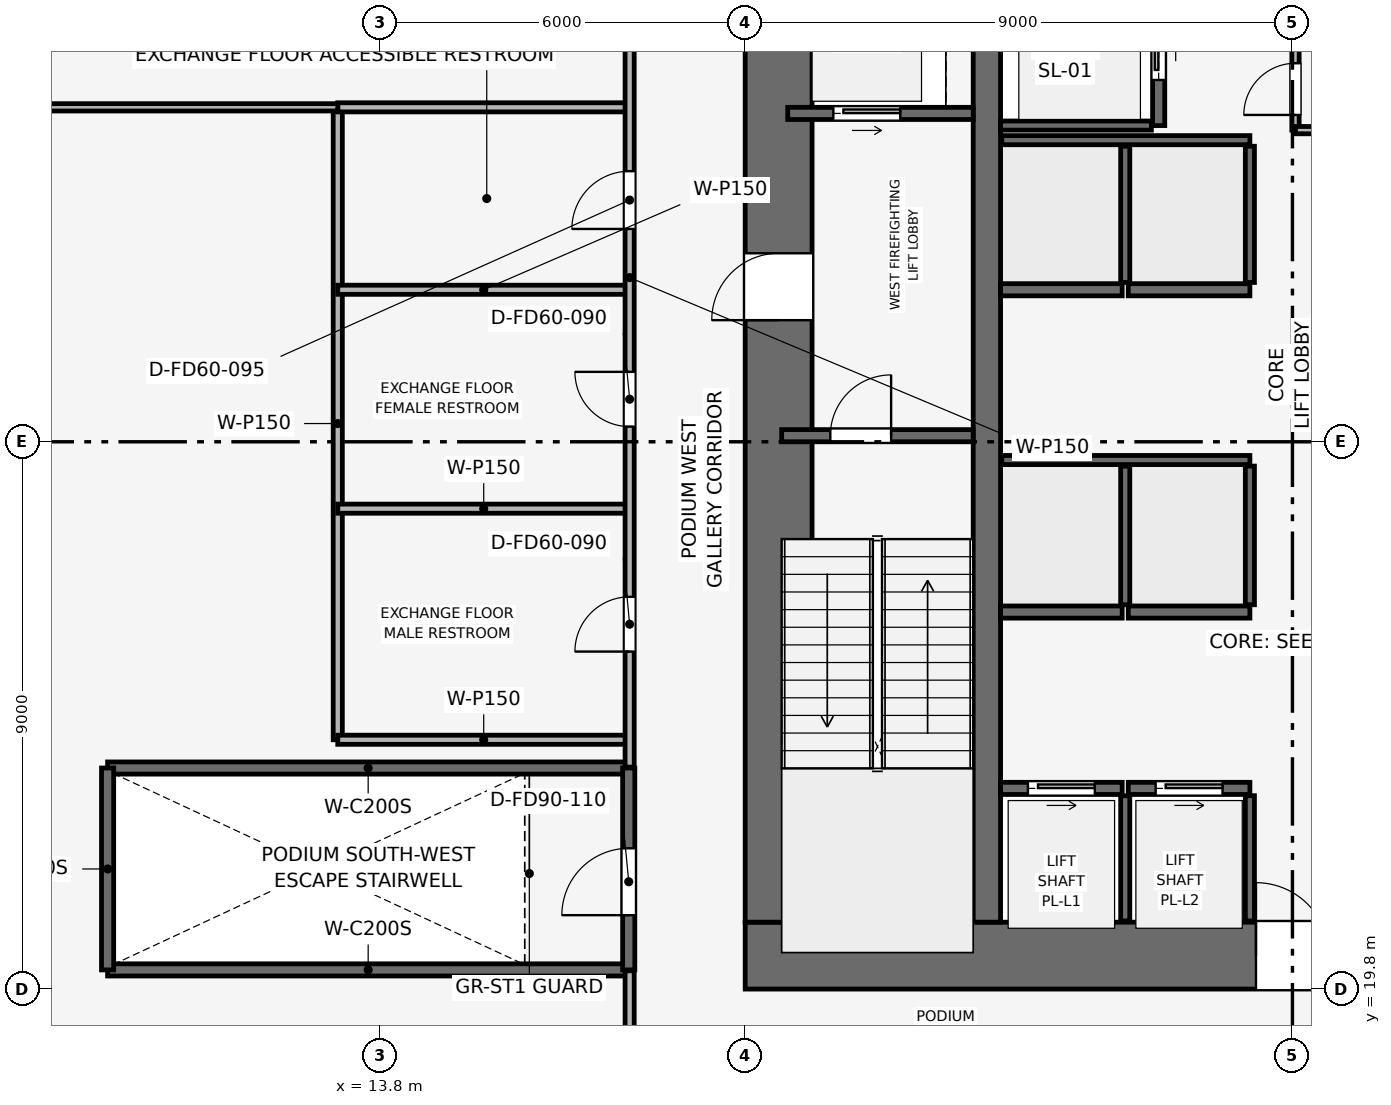
"""IFC4 building model, lengths in metres.
Left out: names, types, materials, properties, quantities, classifications, styles, units other than length and angle.
Written with IfcOpenShell. Run it as: python <this file> out.ifc"""

import sys

from ifc_helpers import new_model, si_unit, direction, frame, frame_2d, origin, place, context, subcontext, project, spatial, rectangle, extrude, element, fill, save


model = new_model("IFC4")
c1 = context("Model", 3, precision=1e-05, world=origin(), true_north=direction((0.0, 1.0)))
c2 = subcontext(c1, "Body", "Model", "MODEL_VIEW")
j1 = project(units=[si_unit("LENGTHUNIT", "METRE"), si_unit("PLANEANGLEUNIT", "RADIAN")], contexts=[c1])
p1 = place(None, origin())
s1 = spatial("IfcSite", under=j1, at=p1, CompositionType="ELEMENT")
p2 = place(p1, origin())
s2 = spatial("IfcBuilding", under=s1, at=p2, CompositionType="ELEMENT")
p3 = place(p2, frame((0.0, 0.0, 19.2)))
s3 = spatial("IfcBuildingStorey", under=s2, at=p3, CompositionType="ELEMENT", Elevation=19.2)
p4 = place(p3, frame((19.8, 20.35, 0.0), z_axis=(0.0, 0.0, 1.0), x_axis=(1.0, 0.0, 0.0)))
e1 = element("IfcWall", 1, at=p4, inside=s3, PredefinedType="SHEAR", context=c2, shape_type="SweptSolid", body=[
    extrude(rectangle(XDim=18.0, YDim=1.1, at=frame_2d((9.0, 0.0))), origin(), (0.0, 0.0, 1.0), 4.8),
])
p5 = place(p4, frame((8.4, 0.0, 0.0)))
e2 = element("IfcOpeningElement", 2, at=p5, cuts=e1, PredefinedType="OPENING", context=c2, shape_type="SweptSolid", body=[
    extrude(rectangle(XDim=1.2, YDim=2.2, at=frame_2d((0.6, 1.1))), frame((0.0, 0.56, 0.0), z_axis=(0.0, -1.0, 0.0), x_axis=(1.0, 0.0, 0.0)), (0.0, 0.0, 1.0), 1.12),
])
p6 = place(p3, frame((20.35, 20.9, 0.0), z_axis=(0.0, 0.0, 1.0), x_axis=(0.0, 1.0, 0.0)))
e3 = element("IfcWall", 3, at=p6, inside=s3, PredefinedType="SHEAR", context=c2, shape_type="SweptSolid", body=[
    extrude(rectangle(XDim=15.8, YDim=1.1, at=frame_2d((7.9, 0.0))), origin(), (0.0, 0.0, 1.0), 4.8),
])
p7 = place(p6, frame((9.9, 0.0, 0.0)))
e4 = element("IfcOpeningElement", 4, at=p7, cuts=e3, PredefinedType="OPENING", context=c2, shape_type="SweptSolid", body=[
    extrude(rectangle(XDim=1.1, YDim=2.15, at=frame_2d((0.55, 1.075))), frame((0.0, 0.56, 0.0), z_axis=(0.0, -1.0, 0.0), x_axis=(1.0, 0.0, 0.0)), (0.0, 0.0, 1.0), 1.12),
])
p8 = place(p3, frame((23.775, 20.9, 0.0), z_axis=(0.0, 0.0, 1.0), x_axis=(0.0, 1.0, 0.0)))
e5 = element("IfcWall", 5, at=p8, inside=s3, PredefinedType="SHEAR", context=c2, shape_type="SweptSolid", body=[
    extrude(rectangle(XDim=15.8, YDim=0.45, at=frame_2d((7.9, 0.0))), origin(), (0.0, 0.0, 1.0), 4.8),
])
p9 = place(p3, frame((20.4, 28.9, 0.0), z_axis=(0.0, 0.0, 1.0), x_axis=(1.0, 0.0, 0.0)))
e6 = element("IfcWall", 6, at=p9, inside=s3, PredefinedType="SHEAR", context=c2, shape_type="SweptSolid", body=[
    extrude(rectangle(XDim=3.15, YDim=0.2, at=frame_2d((1.575, 0.0))), origin(), (0.0, 0.0, 1.0), 4.35),
])
p10 = place(p9, frame((0.8, 0.0, 0.0)))
e7 = element("IfcOpeningElement", 7, at=p10, cuts=e6, PredefinedType="OPENING", context=c2, shape_type="SweptSolid", body=[
    extrude(rectangle(XDim=1.0, YDim=2.1, at=frame_2d((0.5, 1.05))), frame((0.0, 0.11, 0.0), z_axis=(0.0, -1.0, 0.0), x_axis=(1.0, 0.0, 0.0)), (0.0, 0.0, 1.0), 0.22),
])
p11 = place(p3, frame((20.5, 34.2, 0.0), z_axis=(0.0, 0.0, 1.0), x_axis=(1.0, 0.0, 0.0)))
e8 = element("IfcWall", 8, at=p11, inside=s3, PredefinedType="SHEAR", context=c2, shape_type="SweptSolid", body=[
    extrude(rectangle(XDim=3.05, YDim=0.2, at=frame_2d((1.525, 0.0))), origin(), (0.0, 0.0, 1.0), 4.35),
])
p12 = place(p11, frame((0.75, 0.0, 0.0)))
e9 = element("IfcOpeningElement", 9, at=p12, cuts=e8, PredefinedType="OPENING", context=c2, shape_type="SweptSolid", body=[
    extrude(rectangle(XDim=1.1, YDim=2.15, at=frame_2d((0.55, 1.075))), frame((0.0, 0.11, 0.0), z_axis=(0.0, -1.0, 0.0), x_axis=(1.0, 0.0, 0.0)), (0.0, 0.0, 1.0), 0.22),
])
p13 = place(p3, frame((26.6, 34.0, 0.0), z_axis=(0.0, 0.0, 1.0), x_axis=(0.0, 1.0, 0.0)))
e10 = element("IfcWall", 10, at=p13, inside=s3, PredefinedType="SHEAR", context=c2, shape_type="SweptSolid", body=[
    extrude(rectangle(XDim=2.7, YDim=0.2, at=frame_2d((1.35, 0.0))), origin(), (0.0, 0.0, 1.0), 4.35),
])
p14 = place(p13, frame((0.75, 0.0, 0.0)))
e11 = element("IfcOpeningElement", 11, at=p14, cuts=e10, PredefinedType="OPENING", context=c2, shape_type="SweptSolid", body=[
    extrude(rectangle(XDim=1.1, YDim=2.15, at=frame_2d((0.55, 1.075))), frame((0.0, 0.11, 0.0), z_axis=(0.0, -1.0, 0.0), x_axis=(1.0, 0.0, 0.0)), (0.0, 0.0, 1.0), 0.22),
])
p15 = place(p3, frame((24.0, 34.0, 0.0), z_axis=(0.0, 0.0, 1.0), x_axis=(1.0, 0.0, 0.0)))
e12 = element("IfcWall", 12, at=p15, inside=s3, PredefinedType="SHEAR", context=c2, shape_type="SweptSolid", body=[
    extrude(rectangle(XDim=2.48, YDim=0.15, at=frame_2d((1.24, 0.0))), origin(), (0.0, 0.0, 1.0), 4.35),
])
p16 = place(p3, frame((24.0, 23.1, 0.0), z_axis=(0.0, 0.0, 1.0), x_axis=(1.0, 0.0, 0.0)))
e13 = element("IfcWall", 13, at=p16, inside=s3, PredefinedType="SHEAR", context=c2, shape_type="SweptSolid", body=[
    extrude(rectangle(XDim=2.0, YDim=0.2, at=frame_2d((1.0, 0.0))), origin(), (0.0, 0.0, 1.0), 4.35),
])
p17 = place(p16, frame((0.45, 0.0, 0.0)))
e14 = element("IfcOpeningElement", 14, at=p17, cuts=e13, PredefinedType="OPENING", context=c2, shape_type="SweptSolid", body=[
    extrude(rectangle(XDim=1.1, YDim=2.15, at=frame_2d((0.55, 1.075))), frame((0.0, 0.11, 0.0), z_axis=(0.0, -1.0, 0.0), x_axis=(1.0, 0.0, 0.0)), (0.0, 0.0, 1.0), 0.22),
])
p18 = place(p3, frame((26.1, 23.1, 0.0), z_axis=(0.0, 0.0, 1.0), x_axis=(1.0, 0.0, 0.0)))
e15 = element("IfcWall", 15, at=p18, inside=s3, PredefinedType="SHEAR", context=c2, shape_type="SweptSolid", body=[
    extrude(rectangle(XDim=2.0, YDim=0.2, at=frame_2d((1.0, 0.0))), origin(), (0.0, 0.0, 1.0), 4.35),
])
p19 = place(p18, frame((0.45, 0.0, 0.0)))
e16 = element("IfcOpeningElement", 16, at=p19, cuts=e15, PredefinedType="OPENING", context=c2, shape_type="SweptSolid", body=[
    extrude(rectangle(XDim=1.1, YDim=2.15, at=frame_2d((0.55, 1.075))), frame((0.0, 0.11, 0.0), z_axis=(0.0, -1.0, 0.0), x_axis=(1.0, 0.0, 0.0)), (0.0, 0.0, 1.0), 0.22),
])
for number, where, z_axis, x_axis in (
    (17, (24.0, 26.0, 0.0), (0.0, 0.0, 1.0), (1.0, 0.0, 0.0)),
    (18, (26.1, 26.0, 0.0), (0.0, 0.0, 1.0), (1.0, 0.0, 0.0)),
    (19, (24.0, 31.3, 0.0), (0.0, 0.0, 1.0), (1.0, 0.0, 0.0)),
    (20, (26.1, 31.3, 0.0), (0.0, 0.0, 1.0), (1.0, 0.0, 0.0)),
):
    element("IfcWall", number, at=place(p3, frame(where, z_axis=z_axis, x_axis=x_axis)), inside=s3, PredefinedType="SHEAR", context=c2, shape_type="SweptSolid", body=[
        extrude(rectangle(XDim=2.0, YDim=0.2, at=frame_2d((1.0, 0.0))), origin(), (0.0, 0.0, 1.0), 4.35),
    ])
for number, where, z_axis, x_axis in (
    (21, (26.05, 20.92, 0.0), (0.0, 0.0, 1.0), (0.0, 1.0, 0.0)),
    (22, (28.1, 20.92, 0.0), (0.0, 0.0, 1.0), (0.0, 1.0, 0.0)),
):
    element("IfcWall", number, at=place(p3, frame(where, z_axis=z_axis, x_axis=x_axis)), inside=s3, PredefinedType="SHEAR", context=c2, shape_type="SweptSolid", body=[
        extrude(rectangle(XDim=2.06, YDim=0.15, at=frame_2d((1.03, 0.0))), origin(), (0.0, 0.0, 1.0), 4.35),
    ])
p20 = place(p3, frame((24.02, 28.5, 0.0), z_axis=(0.0, 0.0, 1.0), x_axis=(1.0, 0.0, 0.0)))
e23 = element("IfcWall", 23, at=p20, inside=s3, PredefinedType="SHEAR", context=c2, shape_type="SweptSolid", body=[
    extrude(rectangle(XDim=4.08, YDim=0.15, at=frame_2d((2.04, 0.0))), origin(), (0.0, 0.0, 1.0), 4.35),
])
for number, where, z_axis, x_axis in (
    (24, (26.05, 26.12, 0.0), (0.0, 0.0, 1.0), (0.0, 1.0, 0.0)),
    (25, (28.1, 26.12, 0.0), (0.0, 0.0, 1.0), (0.0, 1.0, 0.0)),
):
    element("IfcWall", number, at=place(p3, frame(where, z_axis=z_axis, x_axis=x_axis)), inside=s3, PredefinedType="SHEAR", context=c2, shape_type="SweptSolid", body=[
        extrude(rectangle(XDim=2.28, YDim=0.15, at=frame_2d((1.14, 0.0))), origin(), (0.0, 0.0, 1.0), 4.35),
    ])
p21 = place(p3, frame((24.02, 33.76, 0.0), z_axis=(0.0, 0.0, 1.0), x_axis=(1.0, 0.0, 0.0)))
e26 = element("IfcWall", 26, at=p21, inside=s3, PredefinedType="SHEAR", context=c2, shape_type="SweptSolid", body=[
    extrude(rectangle(XDim=4.08, YDim=0.15, at=frame_2d((2.04, 0.0))), origin(), (0.0, 0.0, 1.0), 4.35),
])
for number, where, z_axis, x_axis in (
    (27, (26.05, 31.42, 0.0), (0.0, 0.0, 1.0), (0.0, 1.0, 0.0)),
    (28, (28.1, 31.42, 0.0), (0.0, 0.0, 1.0), (0.0, 1.0, 0.0)),
):
    element("IfcWall", number, at=place(p3, frame(where, z_axis=z_axis, x_axis=x_axis)), inside=s3, PredefinedType="SHEAR", context=c2, shape_type="SweptSolid", body=[
        extrude(rectangle(XDim=2.24, YDim=0.15, at=frame_2d((1.12, 0.0))), origin(), (0.0, 0.0, 1.0), 4.35),
    ])
for number, where, z_axis, x_axis in (
    (29, (9.315, 20.115, 0.0), (0.0, 0.0, 1.0), (1.0, 0.0, 0.0)),
    (30, (9.315, 23.435, 0.0), (0.0, 0.0, 1.0), (1.0, 0.0, 0.0)),
):
    element("IfcWall", number, at=place(p3, frame(where, z_axis=z_axis, x_axis=x_axis)), inside=s3, PredefinedType="SHEAR", context=c2, shape_type="SweptSolid", body=[
        extrude(rectangle(XDim=8.57, YDim=0.2, at=frame_2d((4.285, 0.0))), origin(), (0.0, 0.0, 1.0), 4.35),
    ])
p22 = place(p3, frame((9.315, 20.115, 0.0), z_axis=(0.0, 0.0, 1.0), x_axis=(0.0, 1.0, 0.0)))
e31 = element("IfcWall", 31, at=p22, inside=s3, PredefinedType="SHEAR", context=c2, shape_type="SweptSolid", body=[
    extrude(rectangle(XDim=3.32, YDim=0.2, at=frame_2d((1.66, 0.0))), origin(), (0.0, 0.0, 1.0), 4.35),
])
p23 = place(p3, frame((17.885, 20.115, 0.0), z_axis=(0.0, 0.0, 1.0), x_axis=(0.0, 1.0, 0.0)))
e32 = element("IfcWall", 32, at=p23, inside=s3, PredefinedType="SHEAR", context=c2, shape_type="SweptSolid", body=[
    extrude(rectangle(XDim=3.32, YDim=0.2, at=frame_2d((1.66, 0.0))), origin(), (0.0, 0.0, 1.0), 4.35),
])
p24 = place(p23, frame((0.9, 0.0, 0.0)))
e33 = element("IfcOpeningElement", 33, at=p24, cuts=e32, PredefinedType="OPENING", context=c2, shape_type="SweptSolid", body=[
    extrude(rectangle(XDim=1.1, YDim=2.15, at=frame_2d((0.55, 1.075))), frame((0.0, 0.11, 0.0), z_axis=(0.0, -1.0, 0.0), x_axis=(1.0, 0.0, 0.0)), (0.0, 0.0, 1.0), 0.22),
])
p25 = place(p3, frame((28.85, 33.925, 0.0), z_axis=(0.0, 0.0, 1.0), x_axis=(0.0, 1.0, 0.0)))
e34 = element("IfcWall", 34, at=p25, inside=s3, PredefinedType="PARTITIONING", context=c2, shape_type="SweptSolid", body=[
    extrude(rectangle(XDim=2.775, YDim=0.12, at=frame_2d((1.387, 0.0))), origin(), (0.0, 0.0, 1.0), 4.35),
])
p26 = place(p25, frame((0.25, 0.0, 0.0)))
e35 = element("IfcOpeningElement", 35, at=p26, cuts=e34, PredefinedType="OPENING", context=c2, shape_type="SweptSolid", body=[
    extrude(rectangle(XDim=0.85, YDim=2.1, at=frame_2d((0.425, 1.05))), frame((0.0, 0.07, 0.0), z_axis=(0.0, -1.0, 0.0), x_axis=(1.0, 0.0, 0.0)), (0.0, 0.0, 1.0), 0.14),
])
p27 = place(p25, frame((1.545, 0.0, 0.0)))
e36 = element("IfcOpeningElement", 36, at=p27, cuts=e34, PredefinedType="OPENING", context=c2, shape_type="SweptSolid", body=[
    extrude(rectangle(XDim=0.85, YDim=2.1, at=frame_2d((0.425, 1.05))), frame((0.0, 0.07, 0.0), z_axis=(0.0, -1.0, 0.0), x_axis=(1.0, 0.0, 0.0)), (0.0, 0.0, 1.0), 0.14),
])
p28 = place(p3, frame((28.85, 33.925, 0.0), z_axis=(0.0, 0.0, 1.0), x_axis=(1.0, 0.0, 0.0)))
e37 = element("IfcWall", 37, at=p28, inside=s3, PredefinedType="PARTITIONING", context=c2, shape_type="SweptSolid", body=[
    extrude(rectangle(XDim=3.3, YDim=0.12, at=frame_2d((1.65, 0.0))), origin(), (0.0, 0.0, 1.0), 4.35),
])
p29 = place(p3, frame((13.1, 23.9, 0.0), z_axis=(0.0, 0.0, 1.0), x_axis=(0.0, 1.0, 0.0)))
e38 = element("IfcWall", 38, at=p29, inside=s3, PredefinedType="PARTITIONING", context=c2, shape_type="SweptSolid", body=[
    extrude(rectangle(XDim=10.4, YDim=0.15, at=frame_2d((5.2, 0.0))), origin(), (0.0, 0.0, 1.0), 3.435),
])
for number, where, z_axis, x_axis in (
    (39, (13.1, 23.9, 0.0), (0.0, 0.0, 1.0), (1.0, 0.0, 0.0)),
    (40, (13.1, 34.3, 0.0), (0.0, 0.0, 1.0), (1.0, 0.0, 0.0)),
    (41, (13.1, 27.7, 0.0), (0.0, 0.0, 1.0), (1.0, 0.0, 0.0)),
    (42, (13.1, 31.3, 0.0), (0.0, 0.0, 1.0), (1.0, 0.0, 0.0)),
):
    element("IfcWall", number, at=place(p3, frame(where, z_axis=z_axis, x_axis=x_axis)), inside=s3, PredefinedType="PARTITIONING", context=c2, shape_type="SweptSolid", body=[
        extrude(rectangle(XDim=4.8, YDim=0.15, at=frame_2d((2.4, 0.0))), origin(), (0.0, 0.0, 1.0), 4.35),
    ])
p30 = place(p3, frame((0.85, 34.3, 0.0), z_axis=(0.0, 0.0, 1.0), x_axis=(1.0, 0.0, 0.0)))
e43 = element("IfcWall", 43, at=p30, inside=s3, PredefinedType="PARTITIONING", context=c2, shape_type="SweptSolid", body=[
    extrude(rectangle(XDim=12.25, YDim=0.12, at=frame_2d((6.125, 0.0))), origin(), (0.0, 0.0, 1.0), 3.335),
])
p31 = place(p3, frame((17.9, 17.9, 0.0), z_axis=(0.0, 0.0, 1.0), x_axis=(0.0, 1.0, 0.0)))
e44 = element("IfcWall", 44, at=p31, inside=s3, PredefinedType="PARTITIONING", context=c2, shape_type="SweptSolid", body=[
    extrude(rectangle(XDim=2.2, YDim=0.15, at=frame_2d((1.1, 0.0))), origin(), (0.0, 0.0, 1.0), 4.35),
])
p32 = place(p3, frame((17.9, 23.45, 0.0), z_axis=(0.0, 0.0, 1.0), x_axis=(0.0, 1.0, 0.0)))
e45 = element("IfcWall", 45, at=p32, inside=s3, PredefinedType="PARTITIONING", context=c2, shape_type="SweptSolid", body=[
    extrude(rectangle(XDim=16.25, YDim=0.15, at=frame_2d((8.125, 0.0))), origin(), (0.0, 0.0, 1.0), 3.435),
])
p33 = place(p32, frame((1.9, 0.0, 0.0)))
e46 = element("IfcOpeningElement", 46, at=p33, cuts=e45, PredefinedType="OPENING", context=c2, shape_type="SweptSolid", body=[
    extrude(rectangle(XDim=0.9, YDim=2.1, at=frame_2d((0.45, 1.05))), frame((0.0, 0.085, 0.0), z_axis=(0.0, -1.0, 0.0), x_axis=(1.0, 0.0, 0.0)), (0.0, 0.0, 1.0), 0.17),
])
p34 = place(p32, frame((5.6, 0.0, 0.0)))
e47 = element("IfcOpeningElement", 47, at=p34, cuts=e45, PredefinedType="OPENING", context=c2, shape_type="SweptSolid", body=[
    extrude(rectangle(XDim=0.9, YDim=2.1, at=frame_2d((0.45, 1.05))), frame((0.0, 0.085, 0.0), z_axis=(0.0, -1.0, 0.0), x_axis=(1.0, 0.0, 0.0)), (0.0, 0.0, 1.0), 0.17),
])
p35 = place(p32, frame((8.85, 0.0, 0.0)))
e48 = element("IfcOpeningElement", 48, at=p35, cuts=e45, PredefinedType="OPENING", context=c2, shape_type="SweptSolid", body=[
    extrude(rectangle(XDim=0.95, YDim=2.1, at=frame_2d((0.475, 1.05))), frame((0.0, 0.085, 0.0), z_axis=(0.0, -1.0, 0.0), x_axis=(1.0, 0.0, 0.0)), (0.0, 0.0, 1.0), 0.17),
])
p36 = place(p32, frame((13.075, 0.0, 0.0)))
e49 = element("IfcOpeningElement", 49, at=p36, cuts=e45, PredefinedType="OPENING", context=c2, shape_type="SweptSolid", body=[
    extrude(rectangle(XDim=1.0, YDim=2.15, at=frame_2d((0.5, 1.075))), frame((0.0, 0.085, 0.0), z_axis=(0.0, -1.0, 0.0), x_axis=(1.0, 0.0, 0.0)), (0.0, 0.0, 1.0), 0.17),
])
p37 = place(p10, origin())
e50 = element("IfcDoor", 50, at=p37, inside=s3, OperationType="SINGLE_SWING_RIGHT", PredefinedType="DOOR", context=c2, shape_type="SweptSolid", body=[
    extrude(rectangle(XDim=1.0, YDim=2.1, at=frame_2d((0.5, 1.05))), frame((0.0, 0.025, 0.0), z_axis=(0.0, -1.0, 0.0), x_axis=(1.0, 0.0, 0.0)), (0.0, 0.0, 1.0), 0.05),
])
fill(e7, e50)
p38 = place(p12, origin())
e51 = element("IfcDoor", 51, at=p38, inside=s3, OperationType="SLIDING_TO_RIGHT", PredefinedType="DOOR", context=c2, shape_type="SweptSolid", body=[
    extrude(rectangle(XDim=1.1, YDim=2.15, at=frame_2d((0.55, 1.075))), frame((0.0, 0.025, 0.0), z_axis=(0.0, -1.0, 0.0), x_axis=(1.0, 0.0, 0.0)), (0.0, 0.0, 1.0), 0.05),
])
fill(e9, e51)
p39 = place(p14, origin())
e52 = element("IfcDoor", 52, at=p39, inside=s3, OperationType="SLIDING_TO_RIGHT", PredefinedType="DOOR", context=c2, shape_type="SweptSolid", body=[
    extrude(rectangle(XDim=1.1, YDim=2.15, at=frame_2d((0.55, 1.075))), frame((0.0, 0.025, 0.0), z_axis=(0.0, -1.0, 0.0), x_axis=(1.0, 0.0, 0.0)), (0.0, 0.0, 1.0), 0.05),
])
fill(e11, e52)
p40 = place(p17, origin())
e53 = element("IfcDoor", 53, at=p40, inside=s3, OperationType="SLIDING_TO_RIGHT", PredefinedType="DOOR", context=c2, shape_type="SweptSolid", body=[
    extrude(rectangle(XDim=1.1, YDim=2.15, at=frame_2d((0.55, 1.075))), frame((0.0, 0.025, 0.0), z_axis=(0.0, -1.0, 0.0), x_axis=(1.0, 0.0, 0.0)), (0.0, 0.0, 1.0), 0.05),
])
fill(e14, e53)
p41 = place(p19, origin())
e54 = element("IfcDoor", 54, at=p41, inside=s3, OperationType="SLIDING_TO_RIGHT", PredefinedType="DOOR", context=c2, shape_type="SweptSolid", body=[
    extrude(rectangle(XDim=1.1, YDim=2.15, at=frame_2d((0.55, 1.075))), frame((0.0, 0.025, 0.0), z_axis=(0.0, -1.0, 0.0), x_axis=(1.0, 0.0, 0.0)), (0.0, 0.0, 1.0), 0.05),
])
fill(e16, e54)
p42 = place(p24, origin())
e55 = element("IfcDoor", 55, at=p42, inside=s3, OperationType="SINGLE_SWING_LEFT", PredefinedType="DOOR", context=c2, shape_type="SweptSolid", body=[
    extrude(rectangle(XDim=1.1, YDim=2.15, at=frame_2d((0.55, 1.075))), frame((0.0, 0.025, 0.0), z_axis=(0.0, -1.0, 0.0), x_axis=(1.0, 0.0, 0.0)), (0.0, 0.0, 1.0), 0.05),
])
fill(e33, e55)
p43 = place(p26, origin())
e56 = element("IfcDoor", 56, at=p43, inside=s3, OperationType="SINGLE_SWING_LEFT", PredefinedType="DOOR", context=c2, shape_type="SweptSolid", body=[
    extrude(rectangle(XDim=0.85, YDim=2.1, at=frame_2d((0.425, 1.05))), frame((0.0, 0.025, 0.0), z_axis=(0.0, -1.0, 0.0), x_axis=(1.0, 0.0, 0.0)), (0.0, 0.0, 1.0), 0.05),
])
fill(e35, e56)
p44 = place(p33, origin())
e57 = element("IfcDoor", 57, at=p44, inside=s3, OperationType="SINGLE_SWING_LEFT", PredefinedType="DOOR", context=c2, shape_type="SweptSolid", body=[
    extrude(rectangle(XDim=0.9, YDim=2.1, at=frame_2d((0.45, 1.05))), frame((0.0, 0.025, 0.0), z_axis=(0.0, -1.0, 0.0), x_axis=(1.0, 0.0, 0.0)), (0.0, 0.0, 1.0), 0.05),
])
fill(e46, e57)
p45 = place(p34, origin())
e58 = element("IfcDoor", 58, at=p45, inside=s3, OperationType="SINGLE_SWING_RIGHT", PredefinedType="DOOR", context=c2, shape_type="SweptSolid", body=[
    extrude(rectangle(XDim=0.9, YDim=2.1, at=frame_2d((0.45, 1.05))), frame((0.0, 0.025, 0.0), z_axis=(0.0, -1.0, 0.0), x_axis=(1.0, 0.0, 0.0)), (0.0, 0.0, 1.0), 0.05),
])
fill(e47, e58)
p46 = place(p35, origin())
e59 = element("IfcDoor", 59, at=p46, inside=s3, OperationType="SINGLE_SWING_LEFT", PredefinedType="DOOR", context=c2, shape_type="SweptSolid", body=[
    extrude(rectangle(XDim=0.95, YDim=2.1, at=frame_2d((0.475, 1.05))), frame((0.0, 0.025, 0.0), z_axis=(0.0, -1.0, 0.0), x_axis=(1.0, 0.0, 0.0)), (0.0, 0.0, 1.0), 0.05),
])
fill(e48, e59)
p47 = place(p7, origin())
e60 = element("IfcDoor", 60, at=p47, inside=s3, OperationType="SINGLE_SWING_LEFT", PredefinedType="DOOR", context=c2, shape_type="SweptSolid", body=[
    extrude(rectangle(XDim=1.1, YDim=2.15, at=frame_2d((0.55, 1.075))), frame((0.0, 0.025, 0.0), z_axis=(0.0, -1.0, 0.0), x_axis=(1.0, 0.0, 0.0)), (0.0, 0.0, 1.0), 0.05),
])
fill(e4, e60)
p48 = place(p5, origin())
e61 = element("IfcDoor", 61, at=p48, inside=s3, OperationType="SINGLE_SWING_LEFT", PredefinedType="DOOR", context=c2, shape_type="SweptSolid", body=[
    extrude(rectangle(XDim=1.2, YDim=2.2, at=frame_2d((0.6, 1.1))), frame((0.0, 0.025, 0.0), z_axis=(0.0, -1.0, 0.0), x_axis=(1.0, 0.0, 0.0)), (0.0, 0.0, 1.0), 0.05),
])
fill(e2, e61)
save(model, sys.argv[1])
